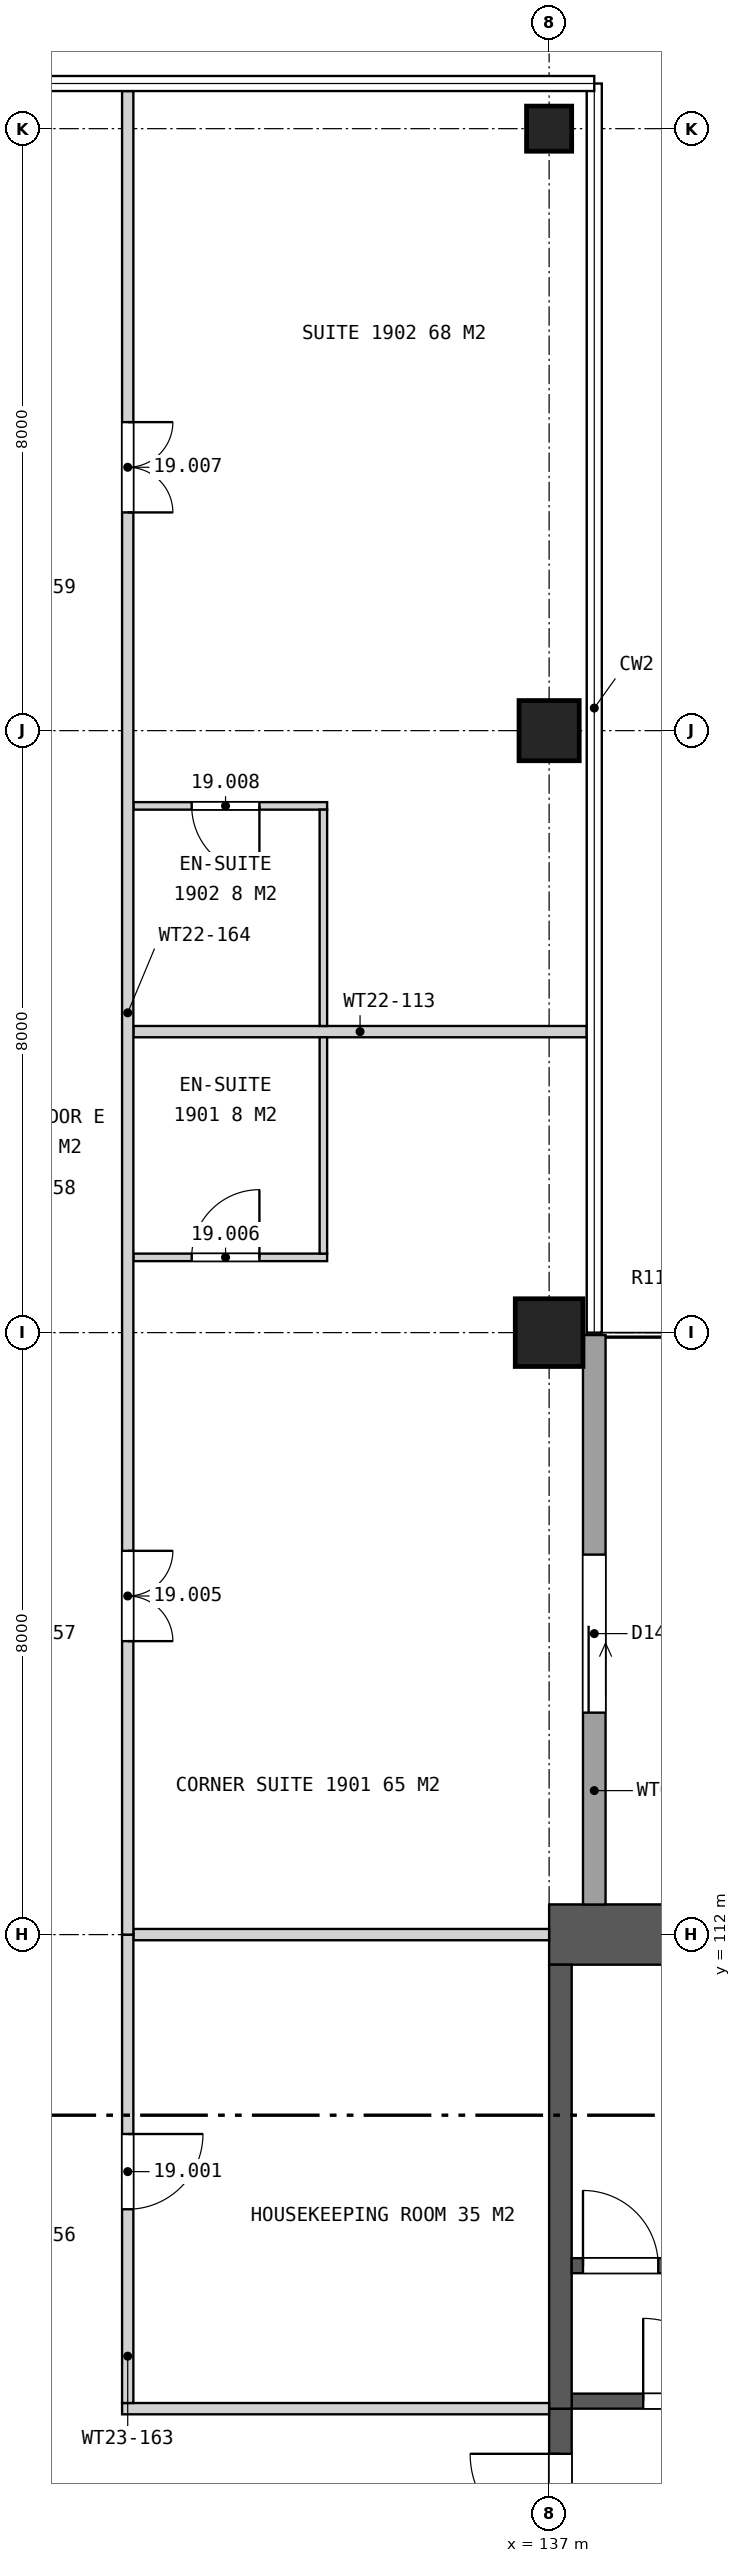
"""IFC4 building model, lengths in metres.
Left out: names, types, materials, properties, quantities, classifications, styles, units other than length and angle.
Written with IfcOpenShell. Run it as: python <this file> out.ifc"""

import sys

from ifc_helpers import new_model, si_unit, direction, frame, frame_2d, origin, origin_2d, place, context, subcontext, project, spatial, rectangle, extrude, element, fill, save


model = new_model("IFC4")
c1 = context("Model", 3, precision=1e-05, world=origin(), true_north=direction((0.0, 1.0)))
c2 = subcontext(c1, "Body", "Model", "MODEL_VIEW")
j1 = project(units=[si_unit("LENGTHUNIT", "METRE"), si_unit("PLANEANGLEUNIT", "RADIAN")], contexts=[c1])
p1 = place(None, origin())
s1 = spatial("IfcSite", under=j1, at=p1, CompositionType="ELEMENT")
p2 = place(p1, origin())
s2 = spatial("IfcBuilding", under=s1, at=p2, CompositionType="ELEMENT")
p3 = place(p2, frame((0.0, 0.0, 97.9)))
s3 = spatial("IfcBuildingStorey", under=s2, at=p3, CompositionType="ELEMENT", Elevation=97.9)
p4 = place(p3, frame((137.0, 120.0, 0.0), z_axis=(0.0, 0.0, 1.0), x_axis=(1.0, 0.0, 0.0)))
e1 = element("IfcColumn", 1, at=p4, inside=s3, PredefinedType="COLUMN", context=c2, shape_type="SweptSolid", body=[
    extrude(rectangle(XDim=0.9, YDim=0.9, at=origin_2d()), origin(), (0.0, 0.0, 1.0), 3.7),
])
p5 = place(p3, frame((137.0, 128.0, 0.0), z_axis=(0.0, 0.0, 1.0), x_axis=(1.0, 0.0, 0.0)))
e2 = element("IfcColumn", 2, at=p5, inside=s3, PredefinedType="COLUMN", context=c2, shape_type="SweptSolid", body=[
    extrude(rectangle(XDim=0.8, YDim=0.8, at=origin_2d()), origin(), (0.0, 0.0, 1.0), 3.7),
])
p6 = place(p3, frame((137.0, 136.0, 0.0), z_axis=(0.0, 0.0, 1.0), x_axis=(1.0, 0.0, 0.0)))
e3 = element("IfcColumn", 3, at=p6, inside=s3, PredefinedType="COLUMN", context=c2, shape_type="SweptSolid", body=[
    extrude(rectangle(XDim=0.6, YDim=0.6, at=origin_2d()), origin(), (0.0, 0.0, 1.0), 3.7),
])
p7 = place(p3, frame((137.0, 112.0, 0.0), z_axis=(0.0, 0.0, 1.0), x_axis=(1.0, 0.0, 0.0)))
e4 = element("IfcWall", 4, at=p7, inside=s3, PredefinedType="SHEAR", context=c2, shape_type="SweptSolid", body=[
    extrude(rectangle(XDim=7.1, YDim=0.8, at=frame_2d((3.55, 0.0))), origin(), (0.0, 0.0, 1.0), 3.7),
])
p8 = place(p3, frame((137.15, 94.3, 0.0), z_axis=(0.0, 0.0, 1.0), x_axis=(0.0, 1.0, 0.0)))
e5 = element("IfcWall", 5, at=p8, inside=s3, PredefinedType="SHEAR", context=c2, shape_type="SweptSolid", body=[
    extrude(rectangle(XDim=11.4, YDim=0.3, at=frame_2d((5.7, 0.0))), origin(), (0.0, 0.0, 1.0), 3.7),
])
p9 = place(p8, frame((0.6, 0.0, 0.0)))
e6 = element("IfcOpeningElement", 6, at=p9, cuts=e5, PredefinedType="OPENING", context=c2, shape_type="SweptSolid", body=[
    extrude(rectangle(XDim=2.4, YDim=2.4, at=frame_2d((1.2, 1.2))), frame((0.0, 0.16, 0.0), z_axis=(0.0, -1.0, 0.0), x_axis=(1.0, 0.0, 0.0)), (0.0, 0.0, 1.0), 0.32),
])
p10 = place(p8, frame((4.5, 0.0, 0.0)))
e7 = element("IfcOpeningElement", 7, at=p10, cuts=e5, PredefinedType="OPENING", context=c2, shape_type="SweptSolid", body=[
    extrude(rectangle(XDim=2.4, YDim=2.4, at=frame_2d((1.2, 1.2))), frame((0.0, 0.16, 0.0), z_axis=(0.0, -1.0, 0.0), x_axis=(1.0, 0.0, 0.0)), (0.0, 0.0, 1.0), 0.32),
])
p11 = place(p8, frame((8.4, 0.0, 0.0)))
e8 = element("IfcOpeningElement", 8, at=p11, cuts=e5, PredefinedType="OPENING", context=c2, shape_type="SweptSolid", body=[
    extrude(rectangle(XDim=2.4, YDim=2.4, at=frame_2d((1.2, 1.2))), frame((0.0, 0.16, 0.0), z_axis=(0.0, -1.0, 0.0), x_axis=(1.0, 0.0, 0.0)), (0.0, 0.0, 1.0), 0.32),
])
p12 = place(p3, frame((137.3, 105.8, 0.0), z_axis=(0.0, 0.0, 1.0), x_axis=(1.0, 0.0, 0.0)))
e9 = element("IfcWall", 9, at=p12, inside=s3, PredefinedType="SHEAR", context=c2, shape_type="SweptSolid", body=[
    extrude(rectangle(XDim=15.3, YDim=0.2, at=frame_2d((7.65, 0.0))), origin(), (0.0, 0.0, 1.0), 3.7),
])
p13 = place(p12, frame((0.95, 0.0, 0.0)))
e10 = element("IfcOpeningElement", 10, at=p13, cuts=e9, PredefinedType="OPENING", context=c2, shape_type="SweptSolid", body=[
    extrude(rectangle(XDim=1.1, YDim=2.1, at=frame_2d((0.55, 1.05))), frame((0.0, 0.11, 0.0), z_axis=(0.0, -1.0, 0.0), x_axis=(1.0, 0.0, 0.0)), (0.0, 0.0, 1.0), 0.22),
])
p14 = place(p3, frame((137.15, 105.7, 0.0), z_axis=(0.0, 0.0, 1.0), x_axis=(0.0, 1.0, 0.0)))
e11 = element("IfcWall", 11, at=p14, inside=s3, PredefinedType="SHEAR", context=c2, shape_type="SweptSolid", body=[
    extrude(rectangle(XDim=5.9, YDim=0.3, at=frame_2d((2.95, 0.0))), origin(), (0.0, 0.0, 1.0), 3.7),
])
p15 = place(p3, frame((137.3, 107.6, 0.0), z_axis=(0.0, 0.0, 1.0), x_axis=(1.0, 0.0, 0.0)))
e12 = element("IfcWall", 12, at=p15, inside=s3, PredefinedType="SHEAR", context=c2, shape_type="SweptSolid", body=[
    extrude(rectangle(XDim=6.8, YDim=0.2, at=frame_2d((3.4, 0.0))), origin(), (0.0, 0.0, 1.0), 3.7),
])
p16 = place(p15, frame((0.15, 0.0, 0.0)))
e13 = element("IfcOpeningElement", 13, at=p16, cuts=e12, PredefinedType="OPENING", context=c2, shape_type="SweptSolid", body=[
    extrude(rectangle(XDim=1.0, YDim=2.1, at=frame_2d((0.5, 1.05))), frame((0.0, 0.11, 0.0), z_axis=(0.0, -1.0, 0.0), x_axis=(1.0, 0.0, 0.0)), (0.0, 0.0, 1.0), 0.22),
])
p17 = place(p3, frame((137.6, 112.4, 0.0), z_axis=(0.0, 0.0, 1.0), x_axis=(0.0, 1.0, 0.0)))
e14 = element("IfcWall", 14, at=p17, inside=s3, PredefinedType="SOLIDWALL", context=c2, shape_type="SweptSolid", body=[
    extrude(rectangle(XDim=7.568, YDim=0.3, at=frame_2d((3.784, 0.0))), origin(), (0.0, 0.0, 1.0), 3.42),
])
p18 = place(p17, frame((2.55, 0.0, 0.0)))
e15 = element("IfcOpeningElement", 15, at=p18, cuts=e14, PredefinedType="OPENING", context=c2, shape_type="SweptSolid", body=[
    extrude(rectangle(XDim=2.1, YDim=2.4, at=frame_2d((1.05, 1.2))), frame((0.0, 0.16, 0.0), z_axis=(0.0, -1.0, 0.0), x_axis=(1.0, 0.0, 0.0)), (0.0, 0.0, 1.0), 0.32),
])
p19 = place(p3, frame((131.325, 105.7, 0.0), z_axis=(0.0, 0.0, 1.0), x_axis=(1.0, 0.0, 0.0)))
e16 = element("IfcWall", 16, at=p19, inside=s3, PredefinedType="PARTITIONING", context=c2, shape_type="SweptSolid", body=[
    extrude(rectangle(XDim=5.675, YDim=0.15, at=frame_2d((2.837, 0.0))), origin(), (0.0, 0.0, 1.0), 3.7),
])
p20 = place(p3, frame((131.475, 112.0, 0.0), z_axis=(0.0, 0.0, 1.0), x_axis=(1.0, 0.0, 0.0)))
e17 = element("IfcWall", 17, at=p20, inside=s3, PredefinedType="PARTITIONING", context=c2, shape_type="SweptSolid", body=[
    extrude(rectangle(XDim=5.525, YDim=0.15, at=frame_2d((2.762, 0.0))), origin(), (0.0, 0.0, 1.0), 2.957),
])
p21 = place(p3, frame((131.475, 121.0, 0.0), z_axis=(0.0, 0.0, 1.0), x_axis=(1.0, 0.0, 0.0)))
e18 = element("IfcWall", 18, at=p21, inside=s3, PredefinedType="PLUMBINGWALL", context=c2, shape_type="SweptSolid", body=[
    extrude(rectangle(XDim=2.575, YDim=0.1, at=frame_2d((1.288, 0.0))), origin(), (0.0, 0.0, 1.0), 3.7),
])
p22 = place(p21, frame((0.775, 0.0, 0.0)))
e19 = element("IfcOpeningElement", 19, at=p22, cuts=e18, PredefinedType="OPENING", context=c2, shape_type="SweptSolid", body=[
    extrude(rectangle(XDim=0.9, YDim=2.1, at=frame_2d((0.45, 1.05))), frame((0.0, 0.06, 0.0), z_axis=(0.0, -1.0, 0.0), x_axis=(1.0, 0.0, 0.0)), (0.0, 0.0, 1.0), 0.12),
])
p23 = place(p3, frame((131.475, 124.0, 0.0), z_axis=(0.0, 0.0, 1.0), x_axis=(1.0, 0.0, 0.0)))
e20 = element("IfcWall", 20, at=p23, inside=s3, PredefinedType="PARTITIONING", context=c2, shape_type="SweptSolid", body=[
    extrude(rectangle(XDim=6.025, YDim=0.15, at=frame_2d((3.012, 0.0))), origin(), (0.0, 0.0, 1.0), 2.963),
])
p24 = place(p3, frame((131.475, 127.0, 0.0), z_axis=(0.0, 0.0, 1.0), x_axis=(1.0, 0.0, 0.0)))
e21 = element("IfcWall", 21, at=p24, inside=s3, PredefinedType="PLUMBINGWALL", context=c2, shape_type="SweptSolid", body=[
    extrude(rectangle(XDim=2.575, YDim=0.1, at=frame_2d((1.288, 0.0))), origin(), (0.0, 0.0, 1.0), 3.7),
])
p25 = place(p24, frame((0.775, 0.0, 0.0)))
e22 = element("IfcOpeningElement", 22, at=p25, cuts=e21, PredefinedType="OPENING", context=c2, shape_type="SweptSolid", body=[
    extrude(rectangle(XDim=0.9, YDim=2.1, at=frame_2d((0.45, 1.05))), frame((0.0, 0.06, 0.0), z_axis=(0.0, -1.0, 0.0), x_axis=(1.0, 0.0, 0.0)), (0.0, 0.0, 1.0), 0.12),
])
p26 = place(p3, frame((131.4, 105.775, 0.0), z_axis=(0.0, 0.0, 1.0), x_axis=(0.0, 1.0, 0.0)))
e23 = element("IfcWall", 23, at=p26, inside=s3, PredefinedType="PARTITIONING", context=c2, shape_type="SweptSolid", body=[
    extrude(rectangle(XDim=6.225, YDim=0.15, at=frame_2d((3.113, 0.0))), origin(), (0.0, 0.0, 1.0), 2.957),
])
p27 = place(p26, frame((2.575, 0.0, 0.0)))
e24 = element("IfcOpeningElement", 24, at=p27, cuts=e23, PredefinedType="OPENING", context=c2, shape_type="SweptSolid", body=[
    extrude(rectangle(XDim=1.0, YDim=2.1, at=frame_2d((0.5, 1.05))), frame((0.0, 0.085, 0.0), z_axis=(0.0, -1.0, 0.0), x_axis=(1.0, 0.0, 0.0)), (0.0, 0.0, 1.0), 0.17),
])
p28 = place(p3, frame((131.4, 112.0, 0.0), z_axis=(0.0, 0.0, 1.0), x_axis=(0.0, 1.0, 0.0)))
e25 = element("IfcWall", 25, at=p28, inside=s3, PredefinedType="PARTITIONING", context=c2, shape_type="SweptSolid", body=[
    extrude(rectangle(XDim=24.5, YDim=0.15, at=frame_2d((12.25, 0.0))), origin(), (0.0, 0.0, 1.0), 2.957),
])
p29 = place(p28, frame((3.9, 0.0, 0.0)))
e26 = element("IfcOpeningElement", 26, at=p29, cuts=e25, PredefinedType="OPENING", context=c2, shape_type="SweptSolid", body=[
    extrude(rectangle(XDim=1.2, YDim=2.2, at=frame_2d((0.6, 1.1))), frame((0.0, 0.085, 0.0), z_axis=(0.0, -1.0, 0.0), x_axis=(1.0, 0.0, 0.0)), (0.0, 0.0, 1.0), 0.17),
])
p30 = place(p28, frame((18.9, 0.0, 0.0)))
e27 = element("IfcOpeningElement", 27, at=p30, cuts=e25, PredefinedType="OPENING", context=c2, shape_type="SweptSolid", body=[
    extrude(rectangle(XDim=1.2, YDim=2.2, at=frame_2d((0.6, 1.1))), frame((0.0, 0.085, 0.0), z_axis=(0.0, -1.0, 0.0), x_axis=(1.0, 0.0, 0.0)), (0.0, 0.0, 1.0), 0.17),
])
for number, where, z_axis, x_axis in (
    (28, (134.0, 121.05, 0.0), (0.0, 0.0, 1.0), (0.0, 1.0, 0.0)),
    (29, (134.0, 124.075, 0.0), (0.0, 0.0, 1.0), (0.0, 1.0, 0.0)),
):
    element("IfcWall", number, at=place(p3, frame(where, z_axis=z_axis, x_axis=x_axis)), inside=s3, PredefinedType="PLUMBINGWALL", context=c2, shape_type="SweptSolid", body=[
        extrude(rectangle(XDim=2.875, YDim=0.1, at=frame_2d((1.438, 0.0))), origin(), (0.0, 0.0, 1.0), 3.7),
    ])
p31 = place(p11, origin())
e30 = element("IfcDoor", 30, at=p31, inside=s3, OperationType="DOUBLE_DOOR_SINGLE_SWING", PredefinedType="DOOR", context=c2, shape_type="SweptSolid", body=[
    extrude(rectangle(XDim=2.4, YDim=2.4, at=frame_2d((1.2, 1.2))), frame((0.0, 0.025, 0.0), z_axis=(0.0, -1.0, 0.0), x_axis=(1.0, 0.0, 0.0)), (0.0, 0.0, 1.0), 0.05),
])
fill(e8, e30)
p32 = place(p13, origin())
e31 = element("IfcDoor", 31, at=p32, inside=s3, OperationType="SINGLE_SWING_LEFT", PredefinedType="DOOR", context=c2, shape_type="SweptSolid", body=[
    extrude(rectangle(XDim=1.1, YDim=2.1, at=frame_2d((0.55, 1.05))), frame((0.0, 0.025, 0.0), z_axis=(0.0, -1.0, 0.0), x_axis=(1.0, 0.0, 0.0)), (0.0, 0.0, 1.0), 0.05),
])
fill(e10, e31)
p33 = place(p16, origin())
e32 = element("IfcDoor", 32, at=p33, inside=s3, OperationType="SINGLE_SWING_LEFT", PredefinedType="DOOR", context=c2, shape_type="SweptSolid", body=[
    extrude(rectangle(XDim=1.0, YDim=2.1, at=frame_2d((0.5, 1.05))), frame((0.0, 0.025, 0.0), z_axis=(0.0, -1.0, 0.0), x_axis=(1.0, 0.0, 0.0)), (0.0, 0.0, 1.0), 0.05),
])
fill(e13, e32)
p34 = place(p18, frame((2.1, 0.0, 0.0), z_axis=(0.0, 0.0, 1.0), x_axis=(-1.0, 0.0, 0.0)))
e33 = element("IfcDoor", 33, at=p34, inside=s3, OperationType="SLIDING_TO_LEFT", PredefinedType="DOOR", context=c2, shape_type="SweptSolid", body=[
    extrude(rectangle(XDim=2.1, YDim=2.4, at=frame_2d((1.05, 1.2))), frame((0.0, 0.025, 0.0), z_axis=(0.0, -1.0, 0.0), x_axis=(1.0, 0.0, 0.0)), (0.0, 0.0, 1.0), 0.05),
])
fill(e15, e33)
p35 = place(p27, frame((1.0, 0.0, 0.0), z_axis=(0.0, 0.0, 1.0), x_axis=(-1.0, 0.0, 0.0)))
e34 = element("IfcDoor", 34, at=p35, inside=s3, OperationType="SINGLE_SWING_LEFT", PredefinedType="DOOR", context=c2, shape_type="SweptSolid", body=[
    extrude(rectangle(XDim=1.0, YDim=2.1, at=frame_2d((0.5, 1.05))), frame((0.0, 0.025, 0.0), z_axis=(0.0, -1.0, 0.0), x_axis=(1.0, 0.0, 0.0)), (0.0, 0.0, 1.0), 0.05),
])
fill(e24, e34)
p36 = place(p29, frame((1.2, 0.0, 0.0), z_axis=(0.0, 0.0, 1.0), x_axis=(-1.0, 0.0, 0.0)))
e35 = element("IfcDoor", 35, at=p36, inside=s3, OperationType="DOUBLE_DOOR_SINGLE_SWING", PredefinedType="DOOR", context=c2, shape_type="SweptSolid", body=[
    extrude(rectangle(XDim=1.2, YDim=2.2, at=frame_2d((0.6, 1.1))), frame((0.0, 0.025, 0.0), z_axis=(0.0, -1.0, 0.0), x_axis=(1.0, 0.0, 0.0)), (0.0, 0.0, 1.0), 0.05),
])
fill(e26, e35)
p37 = place(p22, origin())
e36 = element("IfcDoor", 36, at=p37, inside=s3, OperationType="SINGLE_SWING_RIGHT", PredefinedType="DOOR", context=c2, shape_type="SweptSolid", body=[
    extrude(rectangle(XDim=0.9, YDim=2.1, at=frame_2d((0.45, 1.05))), frame((0.0, 0.025, 0.0), z_axis=(0.0, -1.0, 0.0), x_axis=(1.0, 0.0, 0.0)), (0.0, 0.0, 1.0), 0.05),
])
fill(e19, e36)
p38 = place(p30, frame((1.2, 0.0, 0.0), z_axis=(0.0, 0.0, 1.0), x_axis=(-1.0, 0.0, 0.0)))
e37 = element("IfcDoor", 37, at=p38, inside=s3, OperationType="DOUBLE_DOOR_SINGLE_SWING", PredefinedType="DOOR", context=c2, shape_type="SweptSolid", body=[
    extrude(rectangle(XDim=1.2, YDim=2.2, at=frame_2d((0.6, 1.1))), frame((0.0, 0.025, 0.0), z_axis=(0.0, -1.0, 0.0), x_axis=(1.0, 0.0, 0.0)), (0.0, 0.0, 1.0), 0.05),
])
fill(e27, e37)
p39 = place(p25, frame((0.9, 0.0, 0.0), z_axis=(0.0, 0.0, 1.0), x_axis=(-1.0, 0.0, 0.0)))
e38 = element("IfcDoor", 38, at=p39, inside=s3, OperationType="SINGLE_SWING_LEFT", PredefinedType="DOOR", context=c2, shape_type="SweptSolid", body=[
    extrude(rectangle(XDim=0.9, YDim=2.1, at=frame_2d((0.45, 1.05))), frame((0.0, 0.025, 0.0), z_axis=(0.0, -1.0, 0.0), x_axis=(1.0, 0.0, 0.0)), (0.0, 0.0, 1.0), 0.05),
])
fill(e22, e38)
save(model, sys.argv[1])
